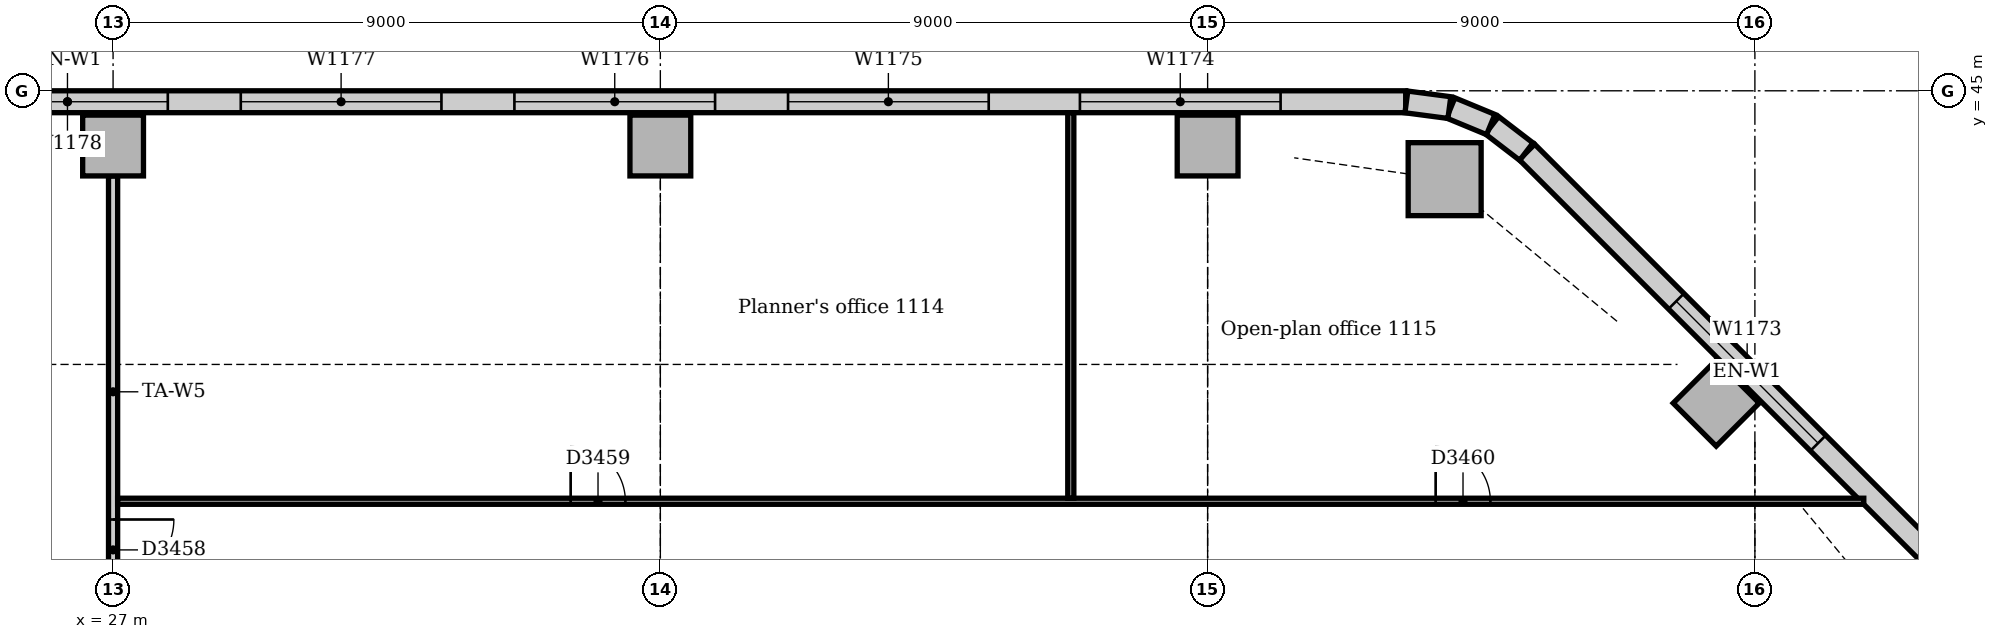
"""IFC4 building model, lengths in metres.
Left out: names, types, materials, properties, quantities, classifications, styles, units other than length and angle.
Written with IfcOpenShell. Run it as: python <this file> out.ifc"""

import sys

from ifc_helpers import new_model, si_unit, direction, frame, frame_2d, origin, origin_2d, place, context, subcontext, project, spatial, rectangle, extrude, element, fill, save


model = new_model("IFC4")
c1 = context("Model", 3, precision=1e-05, world=origin(), true_north=direction((0.0, 1.0)))
c2 = subcontext(c1, "Body", "Model", "MODEL_VIEW")
j1 = project(units=[si_unit("LENGTHUNIT", "METRE"), si_unit("PLANEANGLEUNIT", "RADIAN")], contexts=[c1])
p1 = place(None, origin())
s1 = spatial("IfcSite", under=j1, at=p1, CompositionType="ELEMENT")
p2 = place(p1, origin())
s2 = spatial("IfcBuilding", under=s1, at=p2, CompositionType="ELEMENT")
p3 = place(p2, frame((0.0, 0.0, 51.0)))
s3 = spatial("IfcBuildingStorey", under=s2, at=p3, CompositionType="ELEMENT", Elevation=51.0)
p4 = place(p3, frame((48.898, 43.547, 0.0), z_axis=(0.0, 0.0, 1.0), x_axis=(1.0, 0.0, 0.0)))
e1 = element("IfcColumn", 1, at=p4, inside=s3, PredefinedType="COLUMN", context=c2, shape_type="SweptSolid", body=[
    extrude(rectangle(XDim=1.2, YDim=1.2, at=origin_2d()), origin(), (0.0, 0.0, 1.0), 3.85),
])
for number, where, z_axis, x_axis in (
    (2, (53.364, 39.864, 0.0), (0.0, 0.0, 1.0), (0.707, 0.707, 0.0)),
    (3, (27.0, 44.1, 0.0), (0.0, 0.0, 1.0), (1.0, 0.0, 0.0)),
    (4, (36.0, 44.1, 0.0), (0.0, 0.0, 1.0), (1.0, 0.0, 0.0)),
    (5, (45.0, 44.1, 0.0), (0.0, 0.0, 1.0), (1.0, 0.0, 0.0)),
):
    element("IfcColumn", number, at=place(p3, frame(where, z_axis=z_axis, x_axis=x_axis)), inside=s3, PredefinedType="COLUMN", context=c2, shape_type="SweptSolid", body=[
        extrude(rectangle(XDim=1.0, YDim=1.0, at=origin_2d()), origin(), (0.0, 0.0, 1.0), 3.85),
    ])
p5 = place(p3, frame((57.494, 36.751, 0.0), z_axis=(0.0, 0.0, 1.0), x_axis=(-0.707106781187, 0.707106781187, 0.0)))
e6 = element("IfcWall", 6, at=p5, inside=s3, PredefinedType="STANDARD", context=c2, shape_type="SweptSolid", body=[
    extrude(rectangle(XDim=10.243, YDim=0.36, at=frame_2d((5.121, 0.0))), origin(), (0.0, 0.0, 1.0), 3.85),
])
p6 = place(p5, frame((3.471, 0.0, 0.9)))
e7 = element("IfcOpeningElement", 7, at=p6, cuts=e6, PredefinedType="OPENING", context=c2, shape_type="SweptSolid", body=[
    extrude(rectangle(XDim=3.3, YDim=1.6, at=frame_2d((1.65, 0.8))), frame((0.0, 0.19, 0.0), z_axis=(0.0, -1.0, 0.0), x_axis=(1.0, 0.0, 0.0)), (0.0, 0.0, 1.0), 0.38),
])
p7 = place(p3, frame((48.257, 44.82, 0.0), z_axis=(0.0, 0.0, 1.0), x_axis=(-1.0, 0.0, 0.0)))
e8 = element("IfcWall", 8, at=p7, inside=s3, PredefinedType="STANDARD", context=c2, shape_type="SweptSolid", body=[
    extrude(rectangle(XDim=44.015, YDim=0.36, at=frame_2d((22.007, 0.0))), origin(), (0.0, 0.0, 1.0), 3.85),
])
p8 = place(p7, frame((2.057, 0.0, 0.9)))
e9 = element("IfcOpeningElement", 9, at=p8, cuts=e8, PredefinedType="OPENING", context=c2, shape_type="SweptSolid", body=[
    extrude(rectangle(XDim=3.3, YDim=1.6, at=frame_2d((1.65, 0.8))), frame((0.0, 0.19, 0.0), z_axis=(0.0, -1.0, 0.0), x_axis=(1.0, 0.0, 0.0)), (0.0, 0.0, 1.0), 0.38),
])
p9 = place(p7, frame((6.857, 0.0, 0.9)))
e10 = element("IfcOpeningElement", 10, at=p9, cuts=e8, PredefinedType="OPENING", context=c2, shape_type="SweptSolid", body=[
    extrude(rectangle(XDim=3.3, YDim=1.6, at=frame_2d((1.65, 0.8))), frame((0.0, 0.19, 0.0), z_axis=(0.0, -1.0, 0.0), x_axis=(1.0, 0.0, 0.0)), (0.0, 0.0, 1.0), 0.38),
])
p10 = place(p7, frame((11.357, 0.0, 0.9)))
e11 = element("IfcOpeningElement", 11, at=p10, cuts=e8, PredefinedType="OPENING", context=c2, shape_type="SweptSolid", body=[
    extrude(rectangle(XDim=3.3, YDim=1.6, at=frame_2d((1.65, 0.8))), frame((0.0, 0.19, 0.0), z_axis=(0.0, -1.0, 0.0), x_axis=(1.0, 0.0, 0.0)), (0.0, 0.0, 1.0), 0.38),
])
p11 = place(p7, frame((15.857, 0.0, 0.9)))
e12 = element("IfcOpeningElement", 12, at=p11, cuts=e8, PredefinedType="OPENING", context=c2, shape_type="SweptSolid", body=[
    extrude(rectangle(XDim=3.3, YDim=1.6, at=frame_2d((1.65, 0.8))), frame((0.0, 0.19, 0.0), z_axis=(0.0, -1.0, 0.0), x_axis=(1.0, 0.0, 0.0)), (0.0, 0.0, 1.0), 0.38),
])
p12 = place(p7, frame((20.357, 0.0, 0.9)))
e13 = element("IfcOpeningElement", 13, at=p12, cuts=e8, PredefinedType="OPENING", context=c2, shape_type="SweptSolid", body=[
    extrude(rectangle(XDim=3.3, YDim=1.6, at=frame_2d((1.65, 0.8))), frame((0.0, 0.19, 0.0), z_axis=(0.0, -1.0, 0.0), x_axis=(1.0, 0.0, 0.0)), (0.0, 0.0, 1.0), 0.38),
])
p13 = place(p7, frame((25.957, 0.0, 0.9)))
e14 = element("IfcOpeningElement", 14, at=p13, cuts=e8, PredefinedType="OPENING", context=c2, shape_type="SweptSolid", body=[
    extrude(rectangle(XDim=1.8, YDim=1.6, at=frame_2d((0.9, 0.8))), frame((0.0, 0.19, 0.0), z_axis=(0.0, -1.0, 0.0), x_axis=(1.0, 0.0, 0.0)), (0.0, 0.0, 1.0), 0.38),
])
p14 = place(p7, frame((29.357, 0.0, 0.9)))
e15 = element("IfcOpeningElement", 15, at=p14, cuts=e8, PredefinedType="OPENING", context=c2, shape_type="SweptSolid", body=[
    extrude(rectangle(XDim=3.3, YDim=1.6, at=frame_2d((1.65, 0.8))), frame((0.0, 0.19, 0.0), z_axis=(0.0, -1.0, 0.0), x_axis=(1.0, 0.0, 0.0)), (0.0, 0.0, 1.0), 0.38),
])
p15 = place(p7, frame((33.857, 0.0, 0.9)))
e16 = element("IfcOpeningElement", 16, at=p15, cuts=e8, PredefinedType="OPENING", context=c2, shape_type="SweptSolid", body=[
    extrude(rectangle(XDim=3.3, YDim=1.6, at=frame_2d((1.65, 0.8))), frame((0.0, 0.19, 0.0), z_axis=(0.0, -1.0, 0.0), x_axis=(1.0, 0.0, 0.0)), (0.0, 0.0, 1.0), 0.38),
])
p16 = place(p7, frame((38.357, 0.0, 0.9)))
e17 = element("IfcOpeningElement", 17, at=p16, cuts=e8, PredefinedType="OPENING", context=c2, shape_type="SweptSolid", body=[
    extrude(rectangle(XDim=3.3, YDim=1.6, at=frame_2d((1.65, 0.8))), frame((0.0, 0.19, 0.0), z_axis=(0.0, -1.0, 0.0), x_axis=(1.0, 0.0, 0.0)), (0.0, 0.0, 1.0), 0.38),
])
p17 = place(p3, frame((50.241, 44.0, 0.0), z_axis=(0.0, 0.0, 1.0), x_axis=(-0.793321924995, 0.608802368033, 0.0)))
e18 = element("IfcWall", 18, at=p17, inside=s3, PredefinedType="STANDARD", context=c2, shape_type="SweptSolid", body=[
    extrude(rectangle(XDim=0.713, YDim=0.36, at=frame_2d((0.357, 0.0))), origin(), (0.0, 0.0, 1.0), 3.85),
])
for number, where, z_axis, x_axis in (
    (19, (49.656, 44.445, 0.0), (0.0, 0.0, 1.0), (-0.924, 0.383, 0.0)),
    (20, (48.976, 44.724, 0.0), (0.0, 0.0, 1.0), (-0.991, 0.131, 0.0)),
):
    element("IfcWall", number, at=place(p3, frame(where, z_axis=z_axis, x_axis=x_axis)), inside=s3, PredefinedType="STANDARD", context=c2, shape_type="SweptSolid", body=[
        extrude(rectangle(XDim=0.713, YDim=0.36, at=frame_2d((0.356, 0.0))), origin(), (0.0, 0.0, 1.0), 3.85),
    ])
p18 = place(p3, frame((27.0, 36.5, 0.0), z_axis=(0.0, 0.0, 1.0), x_axis=(0.0, 1.0, 0.0)))
e21 = element("IfcWall", 21, at=p18, inside=s3, PredefinedType="PARTITIONING", context=c2, shape_type="SweptSolid", body=[
    extrude(rectangle(XDim=7.1, YDim=0.15, at=frame_2d((3.55, 0.0))), origin(), (0.0, 0.0, 1.0), 3.158),
])
p19 = place(p18, frame((0.45, 0.0, 0.0)))
e22 = element("IfcOpeningElement", 22, at=p19, cuts=e21, PredefinedType="OPENING", context=c2, shape_type="SweptSolid", body=[
    extrude(rectangle(XDim=1.0, YDim=2.1, at=frame_2d((0.5, 1.05))), frame((0.0, 0.085, 0.0), z_axis=(0.0, -1.0, 0.0), x_axis=(1.0, 0.0, 0.0)), (0.0, 0.0, 1.0), 0.17),
])
p20 = place(p3, frame((27.075, 38.25, 0.0), z_axis=(0.0, 0.0, 1.0), x_axis=(1.0, 0.0, 0.0)))
e23 = element("IfcWall", 23, at=p20, inside=s3, PredefinedType="PARTITIONING", context=c2, shape_type="SweptSolid", body=[
    extrude(rectangle(XDim=28.716, YDim=0.1, at=frame_2d((14.358, 0.0))), origin(), (0.0, 0.0, 1.0), 3.85),
])
p21 = place(p20, frame((7.45, 0.0, 0.0)))
e24 = element("IfcOpeningElement", 24, at=p21, cuts=e23, PredefinedType="OPENING", context=c2, shape_type="SweptSolid", body=[
    extrude(rectangle(XDim=0.9, YDim=2.1, at=frame_2d((0.45, 1.05))), frame((0.0, 0.06, 0.0), z_axis=(0.0, -1.0, 0.0), x_axis=(1.0, 0.0, 0.0)), (0.0, 0.0, 1.0), 0.12),
])
p22 = place(p20, frame((21.675, 0.0, 0.0)))
e25 = element("IfcOpeningElement", 25, at=p22, cuts=e23, PredefinedType="OPENING", context=c2, shape_type="SweptSolid", body=[
    extrude(rectangle(XDim=0.9, YDim=2.1, at=frame_2d((0.45, 1.05))), frame((0.0, 0.06, 0.0), z_axis=(0.0, -1.0, 0.0), x_axis=(1.0, 0.0, 0.0)), (0.0, 0.0, 1.0), 0.12),
])
p23 = place(p3, frame((42.75, 38.3, 0.0), z_axis=(0.0, 0.0, 1.0), x_axis=(0.0, 1.0, 0.0)))
e26 = element("IfcWall", 26, at=p23, inside=s3, PredefinedType="PARTITIONING", context=c2, shape_type="SweptSolid", body=[
    extrude(rectangle(XDim=6.34, YDim=0.1, at=frame_2d((3.17, 0.0))), origin(), (0.0, 0.0, 1.0), 3.85),
])
p24 = place(p6, origin())
e27 = element("IfcWindow", 27, at=p24, inside=s3, PartitioningType="SINGLE_PANEL", PredefinedType="WINDOW", context=c2, shape_type="SweptSolid", body=[
    extrude(rectangle(XDim=3.3, YDim=1.6, at=frame_2d((1.65, 0.8))), frame((0.0, 0.13, 0.0), z_axis=(0.0, -1.0, 0.0), x_axis=(1.0, 0.0, 0.0)), (0.0, 0.0, 1.0), 0.06),
])
fill(e7, e27)
p25 = place(p8, origin())
e28 = element("IfcWindow", 28, at=p25, inside=s3, PartitioningType="SINGLE_PANEL", PredefinedType="WINDOW", context=c2, shape_type="SweptSolid", body=[
    extrude(rectangle(XDim=3.3, YDim=1.6, at=frame_2d((1.65, 0.8))), frame((0.0, 0.13, 0.0), z_axis=(0.0, -1.0, 0.0), x_axis=(1.0, 0.0, 0.0)), (0.0, 0.0, 1.0), 0.06),
])
fill(e9, e28)
p26 = place(p9, origin())
e29 = element("IfcWindow", 29, at=p26, inside=s3, PartitioningType="SINGLE_PANEL", PredefinedType="WINDOW", context=c2, shape_type="SweptSolid", body=[
    extrude(rectangle(XDim=3.3, YDim=1.6, at=frame_2d((1.65, 0.8))), frame((0.0, 0.13, 0.0), z_axis=(0.0, -1.0, 0.0), x_axis=(1.0, 0.0, 0.0)), (0.0, 0.0, 1.0), 0.06),
])
fill(e10, e29)
p27 = place(p10, origin())
e30 = element("IfcWindow", 30, at=p27, inside=s3, PartitioningType="SINGLE_PANEL", PredefinedType="WINDOW", context=c2, shape_type="SweptSolid", body=[
    extrude(rectangle(XDim=3.3, YDim=1.6, at=frame_2d((1.65, 0.8))), frame((0.0, 0.13, 0.0), z_axis=(0.0, -1.0, 0.0), x_axis=(1.0, 0.0, 0.0)), (0.0, 0.0, 1.0), 0.06),
])
fill(e11, e30)
p28 = place(p11, origin())
e31 = element("IfcWindow", 31, at=p28, inside=s3, PartitioningType="SINGLE_PANEL", PredefinedType="WINDOW", context=c2, shape_type="SweptSolid", body=[
    extrude(rectangle(XDim=3.3, YDim=1.6, at=frame_2d((1.65, 0.8))), frame((0.0, 0.13, 0.0), z_axis=(0.0, -1.0, 0.0), x_axis=(1.0, 0.0, 0.0)), (0.0, 0.0, 1.0), 0.06),
])
fill(e12, e31)
p29 = place(p12, origin())
e32 = element("IfcWindow", 32, at=p29, inside=s3, PartitioningType="SINGLE_PANEL", PredefinedType="WINDOW", context=c2, shape_type="SweptSolid", body=[
    extrude(rectangle(XDim=3.3, YDim=1.6, at=frame_2d((1.65, 0.8))), frame((0.0, 0.13, 0.0), z_axis=(0.0, -1.0, 0.0), x_axis=(1.0, 0.0, 0.0)), (0.0, 0.0, 1.0), 0.06),
])
fill(e13, e32)
p30 = place(p19, frame((1.0, 0.0, 0.0), z_axis=(0.0, 0.0, 1.0), x_axis=(-1.0, 0.0, 0.0)))
e33 = element("IfcDoor", 33, at=p30, inside=s3, OperationType="SINGLE_SWING_LEFT", PredefinedType="DOOR", context=c2, shape_type="SweptSolid", body=[
    extrude(rectangle(XDim=1.0, YDim=2.1, at=frame_2d((0.5, 1.05))), frame((0.0, 0.025, 0.0), z_axis=(0.0, -1.0, 0.0), x_axis=(1.0, 0.0, 0.0)), (0.0, 0.0, 1.0), 0.05),
])
fill(e22, e33)
p31 = place(p21, origin())
e34 = element("IfcDoor", 34, at=p31, inside=s3, OperationType="SINGLE_SWING_LEFT", PredefinedType="DOOR", context=c2, shape_type="SweptSolid", body=[
    extrude(rectangle(XDim=0.9, YDim=2.1, at=frame_2d((0.45, 1.05))), frame((0.0, 0.025, 0.0), z_axis=(0.0, -1.0, 0.0), x_axis=(1.0, 0.0, 0.0)), (0.0, 0.0, 1.0), 0.05),
])
fill(e24, e34)
p32 = place(p22, origin())
e35 = element("IfcDoor", 35, at=p32, inside=s3, OperationType="SINGLE_SWING_LEFT", PredefinedType="DOOR", context=c2, shape_type="SweptSolid", body=[
    extrude(rectangle(XDim=0.9, YDim=2.1, at=frame_2d((0.45, 1.05))), frame((0.0, 0.025, 0.0), z_axis=(0.0, -1.0, 0.0), x_axis=(1.0, 0.0, 0.0)), (0.0, 0.0, 1.0), 0.05),
])
fill(e25, e35)
save(model, sys.argv[1])
